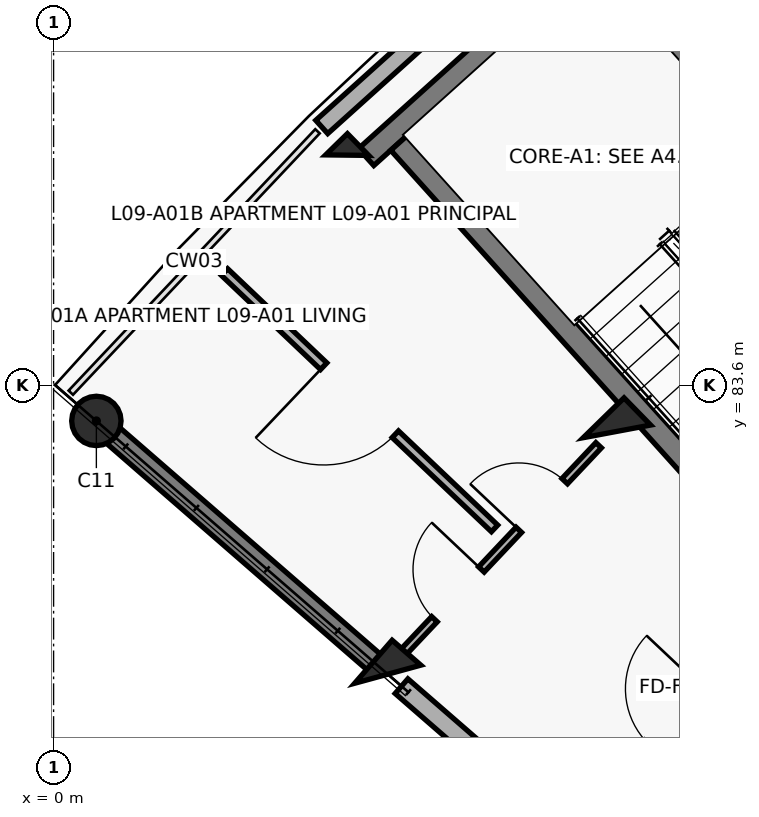
"""IFC4 building model, lengths in metres.
Left out: names, types, materials, properties, quantities, classifications, styles, units other than length and angle.
Written with IfcOpenShell. Run it as: python <this file> out.ifc"""

import sys

from ifc_helpers import new_model, si_unit, direction, frame, frame_2d, origin, origin_2d, place, context, subcontext, project, spatial, rectangle, circle, extrude, element, fill, save


model = new_model("IFC4")
c1 = context("Model", 3, precision=1e-05, world=origin(), true_north=direction((0.0, 1.0)))
c2 = subcontext(c1, "Body", "Model", "MODEL_VIEW")
j1 = project(units=[si_unit("LENGTHUNIT", "METRE"), si_unit("PLANEANGLEUNIT", "RADIAN")], contexts=[c1])
p1 = place(None, origin())
s1 = spatial("IfcSite", under=j1, at=p1, CompositionType="ELEMENT")
p2 = place(p1, origin())
s2 = spatial("IfcBuilding", under=s1, at=p2, CompositionType="ELEMENT")
p3 = place(p2, frame((0.0, 0.0, 29.8)))
s3 = spatial("IfcBuildingStorey", under=s2, at=p3, CompositionType="ELEMENT", Elevation=29.8)
p4 = place(p3, frame((4.397, 79.796, 0.0), z_axis=(0.0, 0.0, 1.0), x_axis=(-0.754709580223, 0.656059028991, 0.0)))
e1 = element("IfcColumn", 1, at=p4, inside=s3, PredefinedType="COLUMN", context=c2, shape_type="SweptSolid", body=[
    extrude(rectangle(XDim=0.5, YDim=0.75, at=origin_2d()), origin(), (0.0, 0.0, 1.0), 3.1),
])
p5 = place(p3, frame((0.563, 83.129, 0.0), z_axis=(0.0, 0.0, 1.0), x_axis=(-0.754709580223, 0.656059028991, 0.0)))
e2 = element("IfcColumn", 2, at=p5, inside=s3, PredefinedType="COLUMN", context=c2, shape_type="SweptSolid", body=[
    extrude(circle(Radius=0.325, at=origin_2d()), origin(), (0.0, 0.0, 1.0), 3.1),
])
p6 = place(p3, frame((7.412, 82.991, 0.0), z_axis=(0.0, 0.0, 1.0), x_axis=(-0.698665066769, 0.715448897181, 0.0)))
e3 = element("IfcColumn", 3, at=p6, inside=s3, PredefinedType="COLUMN", context=c2, shape_type="SweptSolid", body=[
    extrude(rectangle(XDim=0.5, YDim=0.75, at=origin_2d()), origin(), (0.0, 0.0, 1.0), 3.1),
])
p7 = place(p3, frame((3.863, 86.626, 0.0), z_axis=(0.0, 0.0, 1.0), x_axis=(-0.698665066769, 0.715448897181, 0.0)))
e4 = element("IfcColumn", 4, at=p7, inside=s3, PredefinedType="COLUMN", context=c2, shape_type="SweptSolid", body=[
    extrude(rectangle(XDim=0.4, YDim=0.4, at=origin_2d()), origin(), (0.0, 0.0, 1.0), 3.1),
])
p8 = place(p3, frame((4.261, 79.914, 0.0), z_axis=(0.0, 0.0, 1.0), x_axis=(-0.754703505217, 0.65606601742, 0.0)))
e5 = element("IfcWall", 5, at=p8, inside=s3, PredefinedType="SHEAR", context=c2, shape_type="SweptSolid", body=[
    extrude(rectangle(XDim=4.72, YDim=0.27, at=frame_2d((2.36, 0.0))), origin(), (0.0, 0.0, 1.0), 2.86),
])
p9 = place(p3, frame((3.528, 86.997, 0.0), z_axis=(0.0, 0.0, 1.0), x_axis=(0.743387539862, 0.668860946369, 0.0)))
e6 = element("IfcWall", 6, at=p9, inside=s3, PredefinedType="SOLIDWALL", context=c2, shape_type="SweptSolid", body=[
    extrude(rectangle(XDim=4.809, YDim=0.235, at=frame_2d((2.405, 0.0))), origin(), (0.0, 0.0, 1.0), 2.25),
])
p10 = place(p3, frame((10.766, 74.259, 0.0), z_axis=(0.0, 0.0, 1.0), x_axis=(-0.754717680958, 0.656049710044, 0.0)))
e7 = element("IfcWall", 7, at=p10, inside=s3, PredefinedType="SOLIDWALL", context=c2, shape_type="SweptSolid", body=[
    extrude(rectangle(XDim=8.2, YDim=0.255, at=frame_2d((4.1, 0.0))), origin(), (0.0, 0.0, 1.0), 2.18),
])
p11 = place(p10, frame((3.59, 0.0, 0.75)))
e8 = element("IfcOpeningElement", 8, at=p11, cuts=e7, PredefinedType="OPENING", context=c2, shape_type="SweptSolid", body=[
    extrude(rectangle(XDim=1.35, YDim=1.35, at=frame_2d((0.675, 0.675))), frame((0.0, 0.137, 0.0), z_axis=(0.0, -1.0, 0.0), x_axis=(1.0, 0.0, 0.0)), (0.0, 0.0, 1.0), 0.275),
])
p12 = place(p3, frame((7.436, 89.59, 0.0), z_axis=(0.0, 0.0, 1.0), x_axis=(-0.743400052815, -0.668847038922, 0.0)))
e9 = element("IfcWall", 9, at=p12, inside=s3, PredefinedType="SHEAR", context=c2, shape_type="SweptSolid", body=[
    extrude(rectangle(XDim=4.47, YDim=0.3, at=frame_2d((2.235, 0.0))), origin(), (0.0, 0.0, 1.0), 3.1),
])
p13 = place(p3, frame((12.345, 83.461, 0.0), z_axis=(0.0, 0.0, 1.0), x_axis=(-0.668868253964, 0.743380964808, 0.0)))
e10 = element("IfcWall", 10, at=p13, inside=s3, PredefinedType="SHEAR", context=c2, shape_type="SweptSolid", body=[
    extrude(rectangle(XDim=7.69, YDim=0.3, at=frame_2d((3.845, 0.0))), origin(), (0.0, 0.0, 1.0), 3.1),
])
p14 = place(p3, frame((9.691, 81.073, 0.0), z_axis=(0.0, 0.0, 1.0), x_axis=(-0.668885797871, 0.743365179038, 0.0)))
e11 = element("IfcWall", 11, at=p14, inside=s3, PredefinedType="SHEAR", context=c2, shape_type="SweptSolid", body=[
    extrude(rectangle(XDim=7.69, YDim=0.3, at=frame_2d((3.845, 0.0))), origin(), (0.0, 0.0, 1.0), 3.1),
])
p15 = place(p3, frame((7.014, 77.984, 0.0), z_axis=(0.0, 0.0, 1.0), x_axis=(0.686310507227, 0.727308660522, 0.0)))
e12 = element("IfcWall", 12, at=p15, inside=s3, PredefinedType="SOLIDWALL", context=c2, shape_type="SweptSolid", body=[
    extrude(rectangle(XDim=3.436, YDim=0.19, at=frame_2d((1.718, 0.0))), origin(), (0.0, 0.0, 1.0), 2.08),
])
p16 = place(p15, frame((1.208, 0.0, 0.0)))
e13 = element("IfcOpeningElement", 13, at=p16, cuts=e12, PredefinedType="OPENING", context=c2, shape_type="SweptSolid", body=[
    extrude(rectangle(XDim=1.02, YDim=2.15, at=frame_2d((0.51, 1.075))), frame((0.0, 0.105, 0.0), z_axis=(0.0, -1.0, 0.0), x_axis=(1.0, 0.0, 0.0)), (0.0, 0.0, 1.0), 0.21),
])
p17 = place(p3, frame((4.565, 80.047, 0.0), z_axis=(0.0, 0.0, 1.0), x_axis=(0.686300649561, 0.727317962388, 0.0)))
e14 = element("IfcWall", 14, at=p17, inside=s3, PredefinedType="PARTITIONING", context=c2, shape_type="SweptSolid", body=[
    extrude(rectangle(XDim=3.797, YDim=0.1, at=frame_2d((1.899, 0.0))), origin(), (0.0, 0.0, 1.0), 2.08),
])
p18 = place(p17, frame((0.65, 0.0, 0.0)))
e15 = element("IfcOpeningElement", 15, at=p18, cuts=e14, PredefinedType="OPENING", context=c2, shape_type="SweptSolid", body=[
    extrude(rectangle(XDim=0.9, YDim=2.1, at=frame_2d((0.45, 1.05))), frame((0.0, 0.06, 0.0), z_axis=(0.0, -1.0, 0.0), x_axis=(1.0, 0.0, 0.0)), (0.0, 0.0, 1.0), 0.12),
])
p19 = place(p17, frame((2.267, 0.0, 0.0)))
e16 = element("IfcOpeningElement", 16, at=p19, cuts=e14, PredefinedType="OPENING", context=c2, shape_type="SweptSolid", body=[
    extrude(rectangle(XDim=0.88, YDim=2.1, at=frame_2d((0.44, 1.05))), frame((0.0, 0.06, 0.0), z_axis=(0.0, -1.0, 0.0), x_axis=(1.0, 0.0, 0.0)), (0.0, 0.0, 1.0), 0.12),
])
p20 = place(p3, frame((5.802, 81.714, 0.0), z_axis=(0.0, 0.0, 1.0), x_axis=(-0.725204659953, 0.688533369694, 0.0)))
e17 = element("IfcWall", 17, at=p20, inside=s3, PredefinedType="PARTITIONING", context=c2, shape_type="SweptSolid", body=[
    extrude(rectangle(XDim=4.9, YDim=0.12, at=frame_2d((2.45, 0.0))), origin(), (0.0, 0.0, 1.0), 2.08),
])
p21 = place(p20, frame((1.8, 0.0, 0.0)))
e18 = element("IfcOpeningElement", 18, at=p21, cuts=e17, PredefinedType="OPENING", context=c2, shape_type="SweptSolid", body=[
    extrude(rectangle(XDim=1.3, YDim=2.1, at=frame_2d((0.65, 1.05))), frame((0.0, 0.07, 0.0), z_axis=(0.0, -1.0, 0.0), x_axis=(1.0, 0.0, 0.0)), (0.0, 0.0, 1.0), 0.14),
])
p22 = place(p16, origin())
e19 = element("IfcDoor", 19, at=p22, inside=s3, OperationType="SINGLE_SWING_RIGHT", PredefinedType="DOOR", context=c2, shape_type="SweptSolid", body=[
    extrude(rectangle(XDim=1.02, YDim=2.15, at=frame_2d((0.51, 1.075))), frame((0.0, 0.025, 0.0), z_axis=(0.0, -1.0, 0.0), x_axis=(1.0, 0.0, 0.0)), (0.0, 0.0, 1.0), 0.05),
])
fill(e13, e19)
p23 = place(p18, origin())
e20 = element("IfcDoor", 20, at=p23, inside=s3, OperationType="SINGLE_SWING_RIGHT", PredefinedType="DOOR", context=c2, shape_type="SweptSolid", body=[
    extrude(rectangle(XDim=0.9, YDim=2.1, at=frame_2d((0.45, 1.05))), frame((0.0, 0.025, 0.0), z_axis=(0.0, -1.0, 0.0), x_axis=(1.0, 0.0, 0.0)), (0.0, 0.0, 1.0), 0.05),
])
fill(e15, e20)
p24 = place(p19, origin())
e21 = element("IfcDoor", 21, at=p24, inside=s3, OperationType="SINGLE_SWING_LEFT", PredefinedType="DOOR", context=c2, shape_type="SweptSolid", body=[
    extrude(rectangle(XDim=0.88, YDim=2.1, at=frame_2d((0.44, 1.05))), frame((0.0, 0.025, 0.0), z_axis=(0.0, -1.0, 0.0), x_axis=(1.0, 0.0, 0.0)), (0.0, 0.0, 1.0), 0.05),
])
fill(e16, e21)
p25 = place(p21, origin())
e22 = element("IfcDoor", 22, at=p25, inside=s3, OperationType="SINGLE_SWING_RIGHT", PredefinedType="DOOR", context=c2, shape_type="SweptSolid", body=[
    extrude(rectangle(XDim=1.3, YDim=2.1, at=frame_2d((0.65, 1.05))), frame((0.0, 0.025, 0.0), z_axis=(0.0, -1.0, 0.0), x_axis=(1.0, 0.0, 0.0)), (0.0, 0.0, 1.0), 0.05),
])
fill(e18, e22)
save(model, sys.argv[1])
